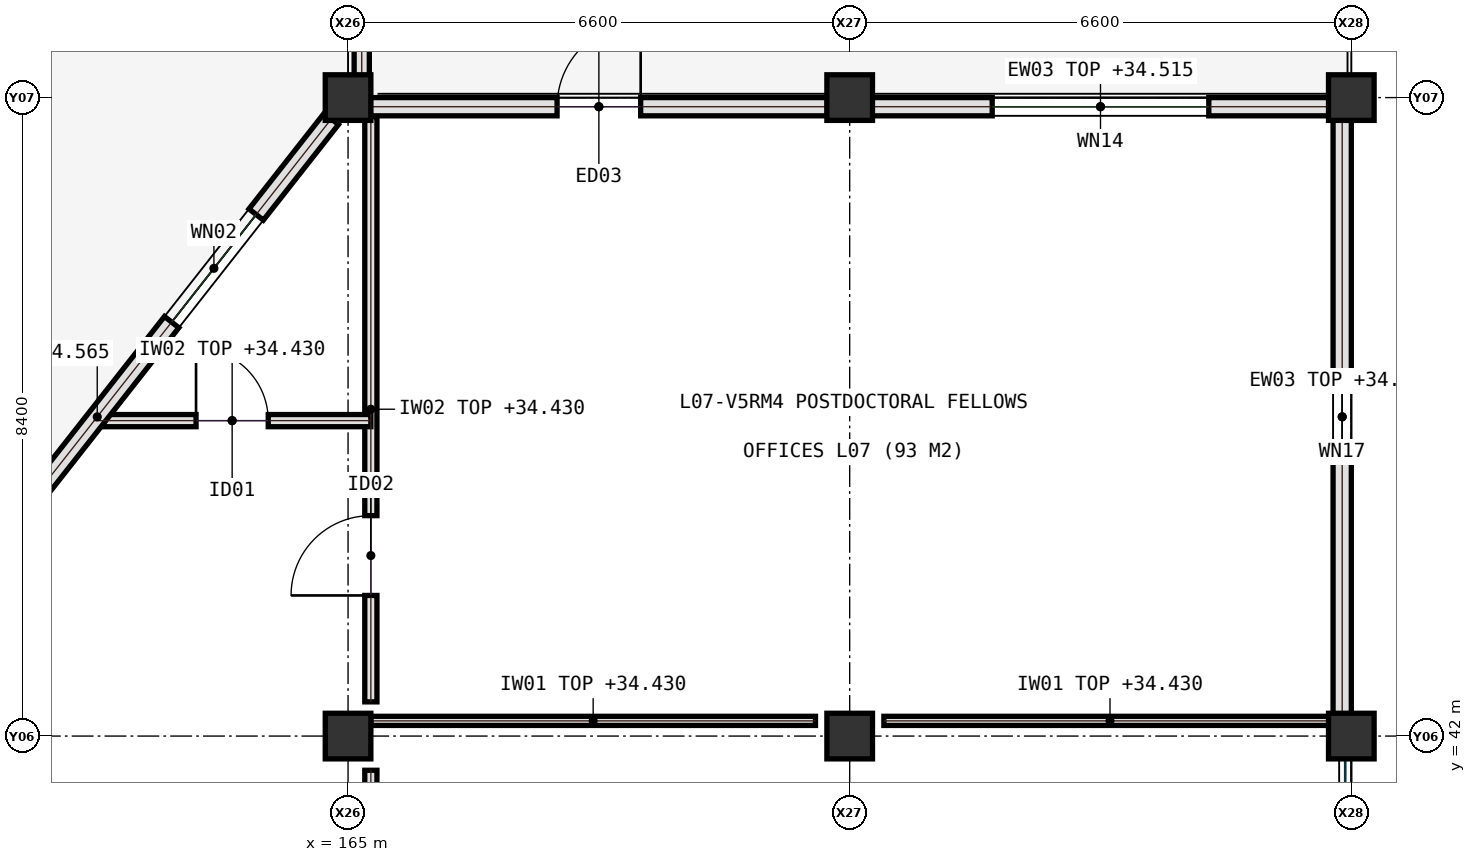
"""IFC4 building model, lengths in metres.
Left out: names, types, materials, properties, quantities, classifications, styles, units other than length and angle.
Written with IfcOpenShell. Run it as: python <this file> out.ifc"""

import sys

from ifc_helpers import new_model, si_unit, direction, frame, frame_2d, origin, origin_2d, place, context, subcontext, project, spatial, rectangle, extrude, element, fill, save


model = new_model("IFC4")
c1 = context("Model", 3, precision=1e-05, world=origin(), true_north=direction((0.0, 1.0)))
c2 = subcontext(c1, "Body", "Model", "MODEL_VIEW")
j1 = project(units=[si_unit("LENGTHUNIT", "METRE"), si_unit("PLANEANGLEUNIT", "RADIAN")], contexts=[c1])
p1 = place(None, origin())
s1 = spatial("IfcSite", under=j1, at=p1, CompositionType="ELEMENT")
p2 = place(p1, origin())
s2 = spatial("IfcBuilding", under=s1, at=p2, CompositionType="ELEMENT")
p3 = place(p2, frame((0.0, 0.0, 31.2)))
s3 = spatial("IfcBuildingStorey", under=s2, at=p3, CompositionType="ELEMENT", Elevation=31.2)
for number, where, z_axis, x_axis in (
    (1, (165.0, 42.0, 0.0), (0.0, 0.0, 1.0), (1.0, 0.0, 0.0)),
    (2, (165.0, 50.4, 0.0), (0.0, 0.0, 1.0), (1.0, 0.0, 0.0)),
    (3, (171.6, 42.0, 0.0), (0.0, 0.0, 1.0), (1.0, 0.0, 0.0)),
    (4, (171.6, 50.4, 0.0), (0.0, 0.0, 1.0), (1.0, 0.0, 0.0)),
    (5, (178.2, 42.0, 0.0), (0.0, 0.0, 1.0), (1.0, 0.0, 0.0)),
    (6, (178.2, 50.4, 0.0), (0.0, 0.0, 1.0), (1.0, 0.0, 0.0)),
):
    element("IfcColumn", number, at=place(p3, frame(where, z_axis=z_axis, x_axis=x_axis)), inside=s3, PredefinedType="COLUMN", context=c2, shape_type="SweptSolid", body=[
        extrude(rectangle(XDim=0.6, YDim=0.6, at=origin_2d()), origin(), (0.0, 0.0, 1.0), 4.2),
    ])
p4 = place(p3, frame((165.3, 33.65, 0.0), z_axis=(0.0, 0.0, 1.0), x_axis=(0.0, 1.0, 0.0)))
e7 = element("IfcWall", 7, at=p4, inside=s3, PredefinedType="PARTITIONING", context=c2, shape_type="SweptSolid", body=[
    extrude(rectangle(XDim=7.9, YDim=0.16, at=frame_2d((3.95, 0.0))), origin(), (0.0, 0.0, 1.0), 3.23),
])
p5 = place(p4, frame((1.9, 0.0, 0.0)))
e8 = element("IfcOpeningElement", 8, at=p5, cuts=e7, PredefinedType="OPENING", context=c2, shape_type="SweptSolid", body=[
    extrude(rectangle(XDim=1.05, YDim=2.15, at=frame_2d((0.525, 1.075))), frame((0.0, 0.09, 0.0), z_axis=(0.0, -1.0, 0.0), x_axis=(1.0, 0.0, 0.0)), (0.0, 0.0, 1.0), 0.18),
])
p6 = place(p4, frame((6.1, 0.0, 0.0)))
e9 = element("IfcOpeningElement", 9, at=p6, cuts=e7, PredefinedType="OPENING", context=c2, shape_type="SweptSolid", body=[
    extrude(rectangle(XDim=1.05, YDim=2.15, at=frame_2d((0.525, 1.075))), frame((0.0, 0.09, 0.0), z_axis=(0.0, -1.0, 0.0), x_axis=(1.0, 0.0, 0.0)), (0.0, 0.0, 1.0), 0.18),
])
p7 = place(p3, frame((165.3, 42.45, 0.0), z_axis=(0.0, 0.0, 1.0), x_axis=(0.0, 1.0, 0.0)))
e10 = element("IfcWall", 10, at=p7, inside=s3, PredefinedType="PARTITIONING", context=c2, shape_type="SweptSolid", body=[
    extrude(rectangle(XDim=7.7, YDim=0.16, at=frame_2d((3.85, 0.0))), origin(), (0.0, 0.0, 1.0), 3.23),
])
p8 = place(p7, frame((1.4, 0.0, 0.0)))
e11 = element("IfcOpeningElement", 11, at=p8, cuts=e10, PredefinedType="OPENING", context=c2, shape_type="SweptSolid", body=[
    extrude(rectangle(XDim=1.05, YDim=2.15, at=frame_2d((0.525, 1.075))), frame((0.0, 0.09, 0.0), z_axis=(0.0, -1.0, 0.0), x_axis=(1.0, 0.0, 0.0)), (0.0, 0.0, 1.0), 0.18),
])
p9 = place(p3, frame((165.3, 42.2, 0.0), z_axis=(0.0, 0.0, 1.0), x_axis=(1.0, 0.0, 0.0)))
e12 = element("IfcWall", 12, at=p9, inside=s3, PredefinedType="PARTITIONING", context=c2, shape_type="SweptSolid", body=[
    extrude(rectangle(XDim=5.85, YDim=0.12, at=frame_2d((2.925, 0.0))), origin(), (0.0, 0.0, 1.0), 3.23),
])
p10 = place(p3, frame((172.05, 42.2, 0.0), z_axis=(0.0, 0.0, 1.0), x_axis=(1.0, 0.0, 0.0)))
e13 = element("IfcWall", 13, at=p10, inside=s3, PredefinedType="PARTITIONING", context=c2, shape_type="SweptSolid", body=[
    extrude(rectangle(XDim=5.95, YDim=0.12, at=frame_2d((2.975, 0.0))), origin(), (0.0, 0.0, 1.0), 3.23),
])
p11 = place(p3, frame((161.65, 46.15, 0.0), z_axis=(0.0, 0.0, 1.0), x_axis=(1.0, 0.0, 0.0)))
e14 = element("IfcWall", 14, at=p11, inside=s3, PredefinedType="PARTITIONING", context=c2, shape_type="SweptSolid", body=[
    extrude(rectangle(XDim=3.65, YDim=0.16, at=frame_2d((1.825, 0.0))), origin(), (0.0, 0.0, 1.0), 3.23),
])
p12 = place(p11, frame((1.35, 0.0, 0.0)))
e15 = element("IfcOpeningElement", 15, at=p12, cuts=e14, PredefinedType="OPENING", context=c2, shape_type="SweptSolid", body=[
    extrude(rectangle(XDim=0.95, YDim=2.15, at=frame_2d((0.475, 1.075))), frame((0.0, 0.09, 0.0), z_axis=(0.0, -1.0, 0.0), x_axis=(1.0, 0.0, 0.0)), (0.0, 0.0, 1.0), 0.18),
])
p13 = place(p3, frame((171.305, 50.28, 0.0), z_axis=(0.0, 0.0, 1.0), x_axis=(-1.0, 0.0, 0.0)))
e16 = element("IfcWall", 16, at=p13, inside=s3, PredefinedType="SOLIDWALL", context=c2, shape_type="SweptSolid", body=[
    extrude(rectangle(XDim=6.01, YDim=0.24, at=frame_2d((3.005, 0.0))), origin(), (0.0, 0.0, 1.0), 3.315),
])
p14 = place(p13, frame((2.455, 0.0, 0.0)))
e17 = element("IfcOpeningElement", 17, at=p14, cuts=e16, PredefinedType="OPENING", context=c2, shape_type="SweptSolid", body=[
    extrude(rectangle(XDim=1.1, YDim=2.2, at=frame_2d((0.55, 1.1))), frame((0.0, 0.13, 0.0), z_axis=(0.0, -1.0, 0.0), x_axis=(1.0, 0.0, 0.0)), (0.0, 0.0, 1.0), 0.26),
])
p15 = place(p3, frame((178.08, 42.295, 0.0), z_axis=(0.0, 0.0, 1.0), x_axis=(0.0, 1.0, 0.0)))
e18 = element("IfcWall", 18, at=p15, inside=s3, PredefinedType="SOLIDWALL", context=c2, shape_type="SweptSolid", body=[
    extrude(rectangle(XDim=7.81, YDim=0.24, at=frame_2d((3.905, 0.0))), origin(), (0.0, 0.0, 1.0), 3.415),
])
p16 = place(p15, frame((3.38, 0.0, 0.95)))
e19 = element("IfcOpeningElement", 19, at=p16, cuts=e18, PredefinedType="OPENING", context=c2, shape_type="SweptSolid", body=[
    extrude(rectangle(XDim=1.05, YDim=1.75, at=frame_2d((0.525, 0.875))), frame((0.0, 0.13, 0.0), z_axis=(0.0, -1.0, 0.0), x_axis=(1.0, 0.0, 0.0)), (0.0, 0.0, 1.0), 0.26),
])
p17 = place(p3, frame((177.905, 50.28, 0.0), z_axis=(0.0, 0.0, 1.0), x_axis=(-1.0, 0.0, 0.0)))
e20 = element("IfcWall", 20, at=p17, inside=s3, PredefinedType="SOLIDWALL", context=c2, shape_type="SweptSolid", body=[
    extrude(rectangle(XDim=6.01, YDim=0.24, at=frame_2d((3.005, 0.0))), origin(), (0.0, 0.0, 1.0), 3.315),
])
p18 = place(p17, frame((1.58, 0.0, 0.95)))
e21 = element("IfcOpeningElement", 21, at=p18, cuts=e20, PredefinedType="OPENING", context=c2, shape_type="SweptSolid", body=[
    extrude(rectangle(XDim=2.85, YDim=1.65, at=frame_2d((1.425, 0.825))), frame((0.0, 0.13, 0.0), z_axis=(0.0, -1.0, 0.0), x_axis=(1.0, 0.0, 0.0)), (0.0, 0.0, 1.0), 0.26),
])
p19 = place(p3, frame((158.62, 42.28, 0.0), z_axis=(0.0, 0.0, 1.0), x_axis=(0.617811819191, 0.786325985878, 0.0)))
e22 = element("IfcWall", 22, at=p19, inside=s3, PredefinedType="SOLIDWALL", context=c2, shape_type="SweptSolid", body=[
    extrude(rectangle(XDim=9.97, YDim=0.24, at=frame_2d((4.985, 0.0))), origin(), (0.0, 0.0, 1.0), 3.365),
])
p20 = place(p19, frame((1.6, 0.0, 0.95)))
e23 = element("IfcOpeningElement", 23, at=p20, cuts=e22, PredefinedType="OPENING", context=c2, shape_type="SweptSolid", body=[
    extrude(rectangle(XDim=1.8, YDim=1.6, at=frame_2d((0.9, 0.8))), frame((0.0, 0.13, 0.0), z_axis=(0.0, -1.0, 0.0), x_axis=(1.0, 0.0, 0.0)), (0.0, 0.0, 1.0), 0.26),
])
p21 = place(p19, frame((6.57, 0.0, 0.95)))
e24 = element("IfcOpeningElement", 24, at=p21, cuts=e22, PredefinedType="OPENING", context=c2, shape_type="SweptSolid", body=[
    extrude(rectangle(XDim=1.8, YDim=1.6, at=frame_2d((0.9, 0.8))), frame((0.0, 0.13, 0.0), z_axis=(0.0, -1.0, 0.0), x_axis=(1.0, 0.0, 0.0)), (0.0, 0.0, 1.0), 0.26),
])
p22 = place(p3, frame((151.95, 50.45, 0.0), z_axis=(0.0, 0.0, 1.0), x_axis=(0.84486875059, 0.534973638861, 0.0)))
e25 = element("IfcWall", 25, at=p22, inside=s3, PredefinedType="PARAPET", context=c2, shape_type="SweptSolid", body=[
    extrude(rectangle(XDim=15.328, YDim=0.2, at=frame_2d((7.664, 0.0))), origin(), (0.0, 0.0, 1.0), 1.1),
])
p23 = place(p3, frame((165.18, 50.45, 0.0), z_axis=(0.0, 0.0, 1.0), x_axis=(0.0, 1.0, 0.0)))
e26 = element("IfcWall", 26, at=p23, inside=s3, PredefinedType="PARAPET", context=c2, shape_type="SweptSolid", body=[
    extrude(rectangle(XDim=8.3, YDim=0.2, at=frame_2d((4.15, 0.0))), origin(), (0.0, 0.0, 1.0), 1.1),
])
p24 = place(p8, origin())
e27 = element("IfcDoor", 27, at=p24, inside=s3, OperationType="SINGLE_SWING_LEFT", PredefinedType="DOOR", context=c2, shape_type="SweptSolid", body=[
    extrude(rectangle(XDim=1.05, YDim=2.15, at=frame_2d((0.525, 1.075))), frame((0.0, 0.025, 0.0), z_axis=(0.0, -1.0, 0.0), x_axis=(1.0, 0.0, 0.0)), (0.0, 0.0, 1.0), 0.05),
])
fill(e11, e27)
p25 = place(p12, origin())
e28 = element("IfcDoor", 28, at=p25, inside=s3, OperationType="SINGLE_SWING_LEFT", PredefinedType="DOOR", context=c2, shape_type="SweptSolid", body=[
    extrude(rectangle(XDim=0.95, YDim=2.15, at=frame_2d((0.475, 1.075))), frame((0.0, 0.025, 0.0), z_axis=(0.0, -1.0, 0.0), x_axis=(1.0, 0.0, 0.0)), (0.0, 0.0, 1.0), 0.05),
])
fill(e15, e28)
p26 = place(p14, frame((1.1, 0.0, 0.0), z_axis=(0.0, 0.0, 1.0), x_axis=(-1.0, 0.0, 0.0)))
e29 = element("IfcDoor", 29, at=p26, inside=s3, OperationType="SINGLE_SWING_LEFT", PredefinedType="DOOR", context=c2, shape_type="SweptSolid", body=[
    extrude(rectangle(XDim=1.1, YDim=2.2, at=frame_2d((0.55, 1.1))), frame((0.0, 0.025, 0.0), z_axis=(0.0, -1.0, 0.0), x_axis=(1.0, 0.0, 0.0)), (0.0, 0.0, 1.0), 0.05),
])
fill(e17, e29)
p27 = place(p16, origin())
e30 = element("IfcWindow", 30, at=p27, inside=s3, PartitioningType="SINGLE_PANEL", PredefinedType="WINDOW", context=c2, shape_type="SweptSolid", body=[
    extrude(rectangle(XDim=1.05, YDim=1.75, at=frame_2d((0.525, 0.875))), frame((0.0, 0.03, 0.0), z_axis=(0.0, -1.0, 0.0), x_axis=(1.0, 0.0, 0.0)), (0.0, 0.0, 1.0), 0.06),
])
fill(e19, e30)
p28 = place(p18, origin())
e31 = element("IfcWindow", 31, at=p28, inside=s3, PartitioningType="SINGLE_PANEL", PredefinedType="WINDOW", context=c2, shape_type="SweptSolid", body=[
    extrude(rectangle(XDim=2.85, YDim=1.65, at=frame_2d((1.425, 0.825))), frame((0.0, 0.03, 0.0), z_axis=(0.0, -1.0, 0.0), x_axis=(1.0, 0.0, 0.0)), (0.0, 0.0, 1.0), 0.06),
])
fill(e21, e31)
p29 = place(p21, origin())
e32 = element("IfcWindow", 32, at=p29, inside=s3, PartitioningType="SINGLE_PANEL", PredefinedType="WINDOW", context=c2, shape_type="SweptSolid", body=[
    extrude(rectangle(XDim=1.8, YDim=1.6, at=frame_2d((0.9, 0.8))), frame((0.0, 0.03, 0.0), z_axis=(0.0, -1.0, 0.0), x_axis=(1.0, 0.0, 0.0)), (0.0, 0.0, 1.0), 0.06),
])
fill(e24, e32)
save(model, sys.argv[1])
